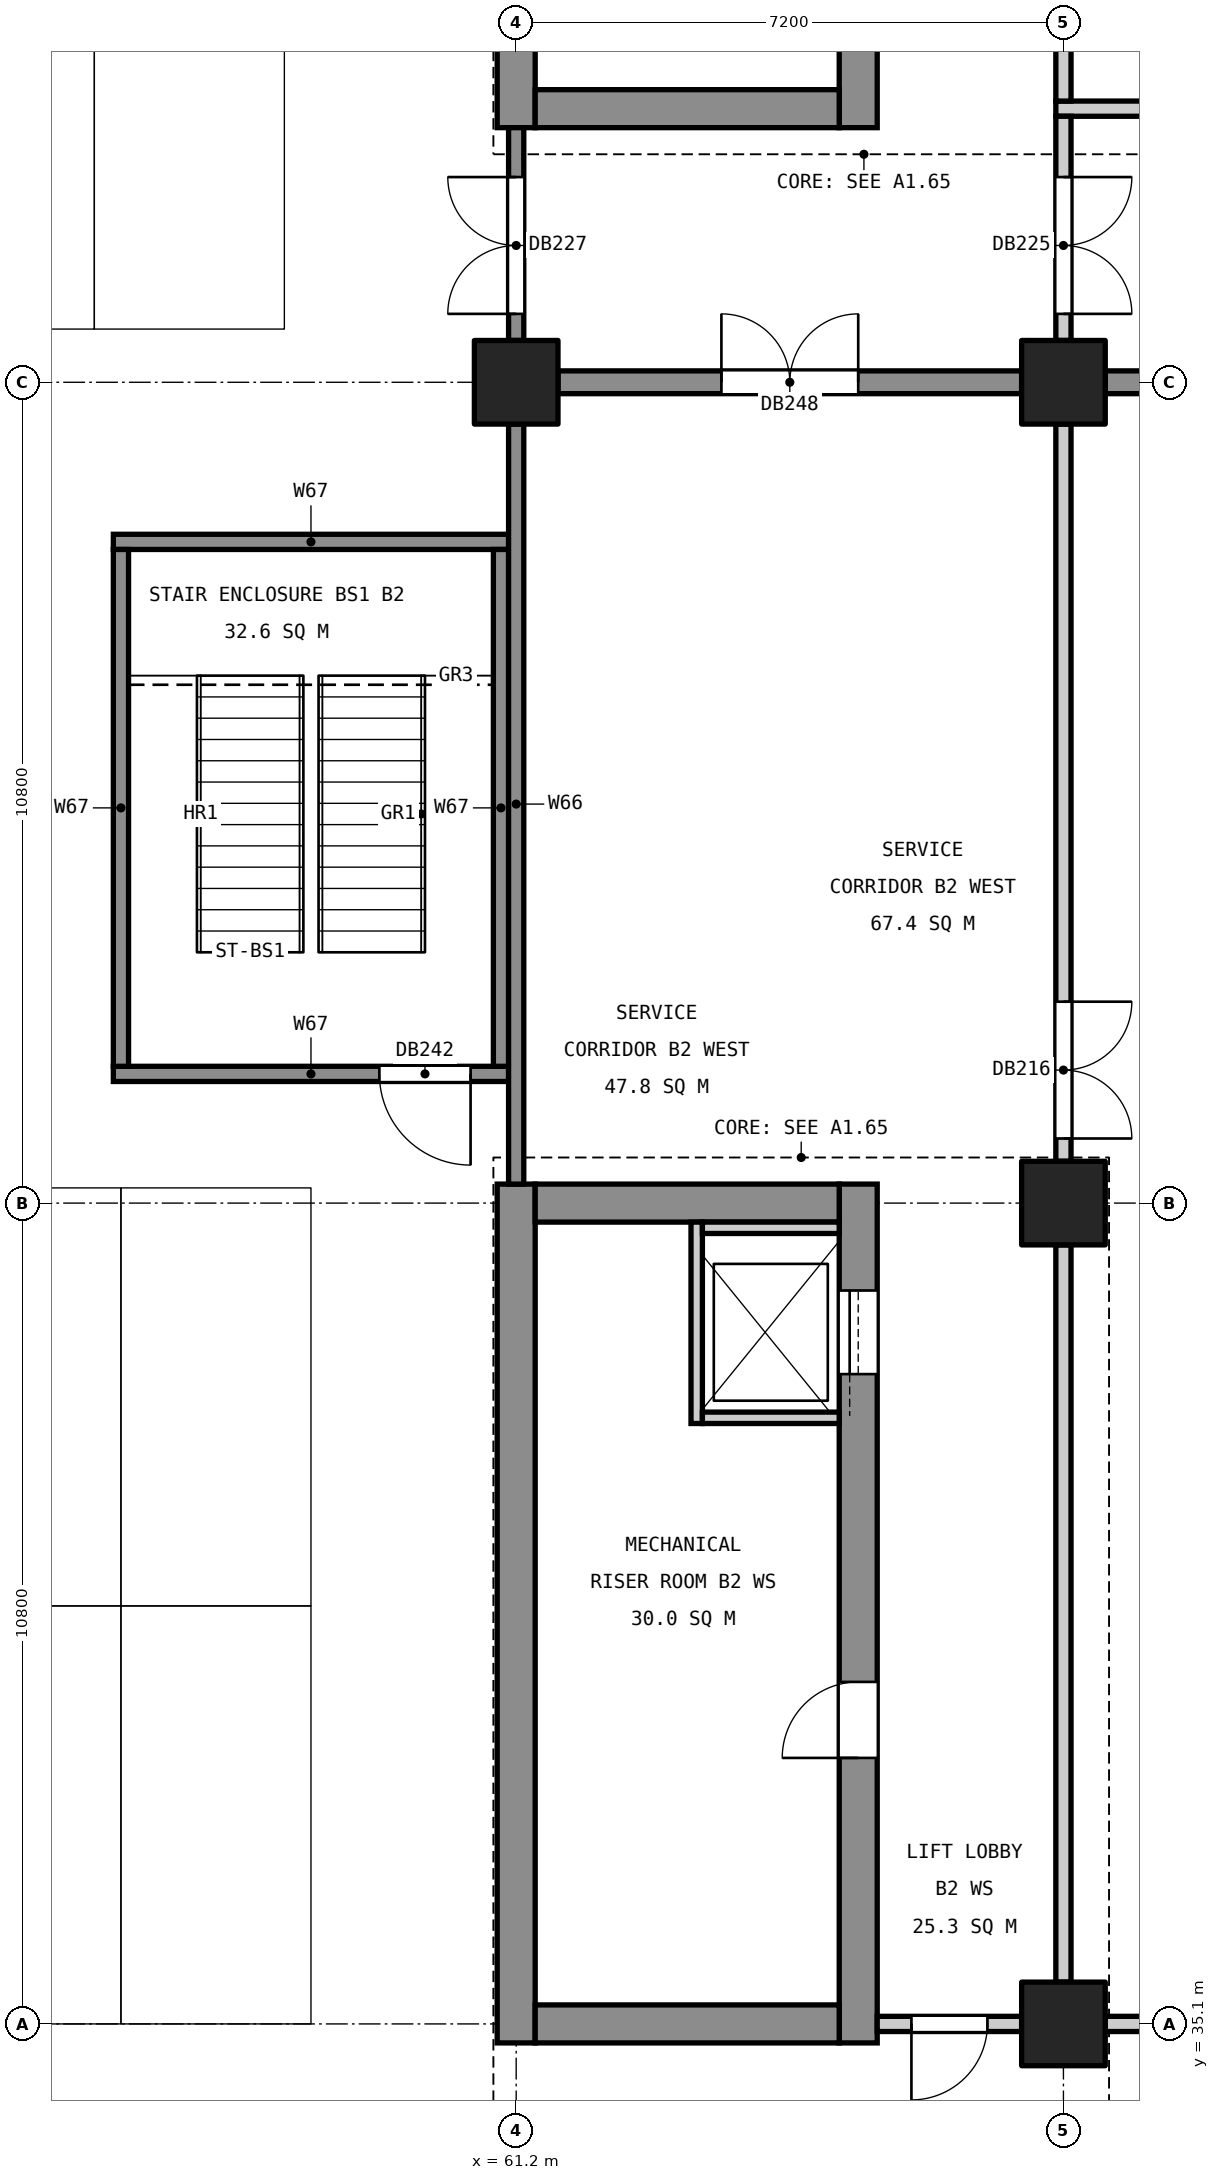
"""IFC4 building model, lengths in metres.
Left out: names, types, materials, properties, quantities, classifications, styles, units other than length and angle.
Written with IfcOpenShell. Run it as: python <this file> out.ifc"""

import sys

from ifc_helpers import new_model, si_unit, direction, frame, frame_2d, origin, origin_2d, place, context, subcontext, project, spatial, rectangle, extrude, element, fill, save


model = new_model("IFC4")
c1 = context("Model", 3, precision=1e-05, world=origin(), true_north=direction((0.0, 1.0)))
c2 = subcontext(c1, "Body", "Model", "MODEL_VIEW")
j1 = project(units=[si_unit("LENGTHUNIT", "METRE"), si_unit("PLANEANGLEUNIT", "RADIAN")], contexts=[c1])
p1 = place(None, origin())
s1 = spatial("IfcSite", under=j1, at=p1, CompositionType="ELEMENT")
p2 = place(p1, origin())
s2 = spatial("IfcBuilding", under=s1, at=p2, CompositionType="ELEMENT")
p3 = place(p2, frame((0.0, 0.0, -9.6)))
s3 = spatial("IfcBuildingStorey", under=s2, at=p3, CompositionType="ELEMENT", Elevation=-9.6)
for number, where, z_axis, x_axis in (
    (1, (61.2, 56.7, 0.0), (0.0, 0.0, 1.0), (1.0, 0.0, 0.0)),
    (2, (68.4, 35.1, 0.0), (0.0, 0.0, 1.0), (1.0, 0.0, 0.0)),
    (3, (68.4, 45.9, 0.0), (0.0, 0.0, 1.0), (1.0, 0.0, 0.0)),
    (4, (68.4, 56.7, 0.0), (0.0, 0.0, 1.0), (1.0, 0.0, 0.0)),
):
    element("IfcColumn", number, at=place(p3, frame(where, z_axis=z_axis, x_axis=x_axis)), inside=s3, PredefinedType="COLUMN", context=c2, shape_type="SweptSolid", body=[
        extrude(rectangle(XDim=1.1, YDim=1.1, at=origin_2d()), origin(), (0.0, 0.0, 1.0), 4.35),
    ])
p4 = place(p3, frame((61.2, 34.85, 0.0), z_axis=(0.0, 0.0, 1.0), x_axis=(0.0, 1.0, 0.0)))
e5 = element("IfcWall", 5, at=p4, inside=s3, PredefinedType="SHEAR", context=c2, shape_type="SweptSolid", body=[
    extrude(rectangle(XDim=11.3, YDim=0.5, at=frame_2d((5.65, 0.0))), origin(), (0.0, 0.0, 1.0), 4.35),
])
p5 = place(p3, frame((65.7, 34.85, 0.0), z_axis=(0.0, 0.0, 1.0), x_axis=(0.0, 1.0, 0.0)))
e6 = element("IfcWall", 6, at=p5, inside=s3, PredefinedType="SHEAR", context=c2, shape_type="SweptSolid", body=[
    extrude(rectangle(XDim=11.3, YDim=0.5, at=frame_2d((5.65, 0.0))), origin(), (0.0, 0.0, 1.0), 4.35),
])
p6 = place(p5, frame((8.8, 0.0, 0.0)))
e7 = element("IfcOpeningElement", 7, at=p6, cuts=e6, PredefinedType="OPENING", context=c2, shape_type="SweptSolid", body=[
    extrude(rectangle(XDim=1.1, YDim=2.1, at=frame_2d((0.55, 1.05))), frame((0.0, 0.26, 0.0), z_axis=(0.0, -1.0, 0.0), x_axis=(1.0, 0.0, 0.0)), (0.0, 0.0, 1.0), 0.52),
])
p7 = place(p5, frame((3.75, 0.0, 0.0)))
e8 = element("IfcOpeningElement", 8, at=p7, cuts=e6, PredefinedType="OPENING", context=c2, shape_type="SweptSolid", body=[
    extrude(rectangle(XDim=1.0, YDim=2.1, at=frame_2d((0.5, 1.05))), frame((0.0, 0.26, 0.0), z_axis=(0.0, -1.0, 0.0), x_axis=(1.0, 0.0, 0.0)), (0.0, 0.0, 1.0), 0.52),
])
for number, where, z_axis, x_axis in (
    (9, (61.45, 35.1, 0.0), (0.0, 0.0, 1.0), (1.0, 0.0, 0.0)),
    (10, (61.45, 45.9, 0.0), (0.0, 0.0, 1.0), (1.0, 0.0, 0.0)),
):
    element("IfcWall", number, at=place(p3, frame(where, z_axis=z_axis, x_axis=x_axis)), inside=s3, PredefinedType="SHEAR", context=c2, shape_type="SweptSolid", body=[
        extrude(rectangle(XDim=4.0, YDim=0.5, at=frame_2d((2.0, 0.0))), origin(), (0.0, 0.0, 1.0), 4.35),
    ])
p8 = place(p3, frame((61.2, 60.05, 0.0), z_axis=(0.0, 0.0, 1.0), x_axis=(0.0, 1.0, 0.0)))
e11 = element("IfcWall", 11, at=p8, inside=s3, PredefinedType="SHEAR", context=c2, shape_type="SweptSolid", body=[
    extrude(rectangle(XDim=14.9, YDim=0.5, at=frame_2d((7.45, 0.0))), origin(), (0.0, 0.0, 1.0), 4.35),
])
p9 = place(p3, frame((65.7, 60.05, 0.0), z_axis=(0.0, 0.0, 1.0), x_axis=(0.0, 1.0, 0.0)))
e12 = element("IfcWall", 12, at=p9, inside=s3, PredefinedType="SHEAR", context=c2, shape_type="SweptSolid", body=[
    extrude(rectangle(XDim=14.9, YDim=0.5, at=frame_2d((7.45, 0.0))), origin(), (0.0, 0.0, 1.0), 4.35),
])
p10 = place(p9, frame((8.85, 0.0, 0.0)))
e13 = element("IfcOpeningElement", 13, at=p10, cuts=e12, PredefinedType="OPENING", context=c2, shape_type="SweptSolid", body=[
    extrude(rectangle(XDim=1.1, YDim=2.1, at=frame_2d((0.55, 1.05))), frame((0.0, 0.26, 0.0), z_axis=(0.0, -1.0, 0.0), x_axis=(1.0, 0.0, 0.0)), (0.0, 0.0, 1.0), 0.52),
])
p11 = place(p9, frame((11.4, 0.0, 0.0)))
e14 = element("IfcOpeningElement", 14, at=p11, cuts=e12, PredefinedType="OPENING", context=c2, shape_type="SweptSolid", body=[
    extrude(rectangle(XDim=1.1, YDim=2.1, at=frame_2d((0.55, 1.05))), frame((0.0, 0.26, 0.0), z_axis=(0.0, -1.0, 0.0), x_axis=(1.0, 0.0, 0.0)), (0.0, 0.0, 1.0), 0.52),
])
p12 = place(p9, frame((3.75, 0.0, 0.0)))
e15 = element("IfcOpeningElement", 15, at=p12, cuts=e12, PredefinedType="OPENING", context=c2, shape_type="SweptSolid", body=[
    extrude(rectangle(XDim=1.0, YDim=2.1, at=frame_2d((0.5, 1.05))), frame((0.0, 0.26, 0.0), z_axis=(0.0, -1.0, 0.0), x_axis=(1.0, 0.0, 0.0)), (0.0, 0.0, 1.0), 0.52),
])
p13 = place(p3, frame((61.45, 60.3, 0.0), z_axis=(0.0, 0.0, 1.0), x_axis=(1.0, 0.0, 0.0)))
e16 = element("IfcWall", 16, at=p13, inside=s3, PredefinedType="SHEAR", context=c2, shape_type="SweptSolid", body=[
    extrude(rectangle(XDim=4.0, YDim=0.5, at=frame_2d((2.0, 0.0))), origin(), (0.0, 0.0, 1.0), 4.35),
])
p14 = place(p3, frame((61.75, 56.7, 0.0), z_axis=(0.0, 0.0, 1.0), x_axis=(1.0, 0.0, 0.0)))
e17 = element("IfcWall", 17, at=p14, inside=s3, PredefinedType="SHEAR", context=c2, shape_type="SweptSolid", body=[
    extrude(rectangle(XDim=6.1, YDim=0.3, at=frame_2d((3.05, 0.0))), origin(), (0.0, 0.0, 1.0), 4.35),
])
p15 = place(p14, frame((2.15, 0.0, 0.0)))
e18 = element("IfcOpeningElement", 18, at=p15, cuts=e17, PredefinedType="OPENING", context=c2, shape_type="SweptSolid", body=[
    extrude(rectangle(XDim=1.8, YDim=2.1, at=frame_2d((0.9, 1.05))), frame((0.0, 0.16, 0.0), z_axis=(0.0, -1.0, 0.0), x_axis=(1.0, 0.0, 0.0)), (0.0, 0.0, 1.0), 0.32),
])
p16 = place(p3, frame((68.95, 56.7, 0.0), z_axis=(0.0, 0.0, 1.0), x_axis=(1.0, 0.0, 0.0)))
e19 = element("IfcWall", 19, at=p16, inside=s3, PredefinedType="SHEAR", context=c2, shape_type="SweptSolid", body=[
    extrude(rectangle(XDim=9.7, YDim=0.3, at=frame_2d((4.85, 0.0))), origin(), (0.0, 0.0, 1.0), 4.35),
])
p17 = place(p3, frame((63.575, 43.0, 0.0), z_axis=(0.0, 0.0, 1.0), x_axis=(0.0, 1.0, 0.0)))
e20 = element("IfcWall", 20, at=p17, inside=s3, PredefinedType="SOLIDWALL", context=c2, shape_type="SweptSolid", body=[
    extrude(rectangle(XDim=2.65, YDim=0.15, at=frame_2d((1.325, 0.0))), origin(), (0.0, 0.0, 1.0), 4.8),
])
for number, where, z_axis, x_axis in (
    (21, (63.65, 43.075, 0.0), (0.0, 0.0, 1.0), (1.0, 0.0, 0.0)),
    (22, (63.65, 45.575, 0.0), (0.0, 0.0, 1.0), (1.0, 0.0, 0.0)),
):
    element("IfcWall", number, at=place(p3, frame(where, z_axis=z_axis, x_axis=x_axis)), inside=s3, PredefinedType="SOLIDWALL", context=c2, shape_type="SweptSolid", body=[
        extrude(rectangle(XDim=1.8, YDim=0.15, at=frame_2d((0.9, 0.0))), origin(), (0.0, 0.0, 1.0), 4.8),
    ])
p18 = place(p3, frame((65.95, 35.1, 0.0), z_axis=(0.0, 0.0, 1.0), x_axis=(1.0, 0.0, 0.0)))
e23 = element("IfcWall", 23, at=p18, inside=s3, PredefinedType="PARTITIONING", context=c2, shape_type="SweptSolid", body=[
    extrude(rectangle(XDim=1.9, YDim=0.2, at=frame_2d((0.95, 0.0))), origin(), (0.0, 0.0, 1.0), 4.35),
])
p19 = place(p18, frame((0.45, 0.0, 0.0)))
e24 = element("IfcOpeningElement", 24, at=p19, cuts=e23, PredefinedType="OPENING", context=c2, shape_type="SweptSolid", body=[
    extrude(rectangle(XDim=1.0, YDim=2.1, at=frame_2d((0.5, 1.05))), frame((0.0, 0.11, 0.0), z_axis=(0.0, -1.0, 0.0), x_axis=(1.0, 0.0, 0.0)), (0.0, 0.0, 1.0), 0.22),
])
p20 = place(p3, frame((68.95, 35.1, 0.0), z_axis=(0.0, 0.0, 1.0), x_axis=(1.0, 0.0, 0.0)))
e25 = element("IfcWall", 25, at=p20, inside=s3, PredefinedType="PARTITIONING", context=c2, shape_type="SweptSolid", body=[
    extrude(rectangle(XDim=9.7, YDim=0.2, at=frame_2d((4.85, 0.0))), origin(), (0.0, 0.0, 1.0), 4.35),
])
p21 = place(p3, frame((55.9, 47.6, 0.0), z_axis=(0.0, 0.0, 1.0), x_axis=(1.0, 0.0, 0.0)))
e26 = element("IfcWall", 26, at=p21, inside=s3, PredefinedType="SOLIDWALL", context=c2, shape_type="SweptSolid", body=[
    extrude(rectangle(XDim=5.2, YDim=0.2, at=frame_2d((2.6, 0.0))), origin(), (0.0, 0.0, 1.0), 4.35),
])
p22 = place(p21, frame((3.5, 0.0, 0.0)))
e27 = element("IfcOpeningElement", 27, at=p22, cuts=e26, PredefinedType="OPENING", context=c2, shape_type="SweptSolid", body=[
    extrude(rectangle(XDim=1.2, YDim=2.1, at=frame_2d((0.6, 1.05))), frame((0.0, 0.11, 0.0), z_axis=(0.0, -1.0, 0.0), x_axis=(1.0, 0.0, 0.0)), (0.0, 0.0, 1.0), 0.22),
])
p23 = place(p3, frame((55.9, 54.6, 0.0), z_axis=(0.0, 0.0, 1.0), x_axis=(1.0, 0.0, 0.0)))
e28 = element("IfcWall", 28, at=p23, inside=s3, PredefinedType="SOLIDWALL", context=c2, shape_type="SweptSolid", body=[
    extrude(rectangle(XDim=5.2, YDim=0.2, at=frame_2d((2.6, 0.0))), origin(), (0.0, 0.0, 1.0), 4.35),
])
p24 = place(p3, frame((68.3, 60.3, 0.0), z_axis=(0.0, 0.0, 1.0), x_axis=(1.0, 0.0, 0.0)))
e29 = element("IfcWall", 29, at=p24, inside=s3, PredefinedType="PARTITIONING", context=c2, shape_type="SweptSolid", body=[
    extrude(rectangle(XDim=11.0, YDim=0.2, at=frame_2d((5.5, 0.0))), origin(), (0.0, 0.0, 1.0), 4.35),
])
for number, where, z_axis, x_axis in (
    (30, (56.0, 47.7, 0.0), (0.0, 0.0, 1.0), (0.0, 1.0, 0.0)),
    (31, (61.0, 47.7, 0.0), (0.0, 0.0, 1.0), (0.0, 1.0, 0.0)),
):
    element("IfcWall", number, at=place(p3, frame(where, z_axis=z_axis, x_axis=x_axis)), inside=s3, PredefinedType="SOLIDWALL", context=c2, shape_type="SweptSolid", body=[
        extrude(rectangle(XDim=6.8, YDim=0.2, at=frame_2d((3.4, 0.0))), origin(), (0.0, 0.0, 1.0), 4.35),
    ])
p25 = place(p3, frame((61.2, 46.15, 0.0), z_axis=(0.0, 0.0, 1.0), x_axis=(0.0, 1.0, 0.0)))
e32 = element("IfcWall", 32, at=p25, inside=s3, PredefinedType="SOLIDWALL", context=c2, shape_type="SweptSolid", body=[
    extrude(rectangle(XDim=10.0, YDim=0.2, at=frame_2d((5.0, 0.0))), origin(), (0.0, 0.0, 1.0), 4.35),
])
p26 = place(p3, frame((61.2, 57.25, 0.0), z_axis=(0.0, 0.0, 1.0), x_axis=(0.0, 1.0, 0.0)))
e33 = element("IfcWall", 33, at=p26, inside=s3, PredefinedType="SOLIDWALL", context=c2, shape_type="SweptSolid", body=[
    extrude(rectangle(XDim=2.8, YDim=0.2, at=frame_2d((1.4, 0.0))), origin(), (0.0, 0.0, 1.0), 4.35),
])
p27 = place(p26, frame((0.35, 0.0, 0.0)))
e34 = element("IfcOpeningElement", 34, at=p27, cuts=e33, PredefinedType="OPENING", context=c2, shape_type="SweptSolid", body=[
    extrude(rectangle(XDim=1.8, YDim=2.1, at=frame_2d((0.9, 1.05))), frame((0.0, 0.11, 0.0), z_axis=(0.0, -1.0, 0.0), x_axis=(1.0, 0.0, 0.0)), (0.0, 0.0, 1.0), 0.22),
])
p28 = place(p3, frame((68.4, 35.65, 0.0), z_axis=(0.0, 0.0, 1.0), x_axis=(0.0, 1.0, 0.0)))
e35 = element("IfcWall", 35, at=p28, inside=s3, PredefinedType="PARTITIONING", context=c2, shape_type="SweptSolid", body=[
    extrude(rectangle(XDim=9.7, YDim=0.2, at=frame_2d((4.85, 0.0))), origin(), (0.0, 0.0, 1.0), 4.35),
])
p29 = place(p3, frame((68.4, 46.45, 0.0), z_axis=(0.0, 0.0, 1.0), x_axis=(0.0, 1.0, 0.0)))
e36 = element("IfcWall", 36, at=p29, inside=s3, PredefinedType="PARTITIONING", context=c2, shape_type="SweptSolid", body=[
    extrude(rectangle(XDim=9.7, YDim=0.2, at=frame_2d((4.85, 0.0))), origin(), (0.0, 0.0, 1.0), 4.35),
])
p30 = place(p29, frame((0.3, 0.0, 0.0)))
e37 = element("IfcOpeningElement", 37, at=p30, cuts=e36, PredefinedType="OPENING", context=c2, shape_type="SweptSolid", body=[
    extrude(rectangle(XDim=1.8, YDim=2.1, at=frame_2d((0.9, 1.05))), frame((0.0, 0.11, 0.0), z_axis=(0.0, -1.0, 0.0), x_axis=(1.0, 0.0, 0.0)), (0.0, 0.0, 1.0), 0.22),
])
p31 = place(p3, frame((68.4, 57.25, 0.0), z_axis=(0.0, 0.0, 1.0), x_axis=(0.0, 1.0, 0.0)))
e38 = element("IfcWall", 38, at=p31, inside=s3, PredefinedType="PARTITIONING", context=c2, shape_type="SweptSolid", body=[
    extrude(rectangle(XDim=2.95, YDim=0.2, at=frame_2d((1.475, 0.0))), origin(), (0.0, 0.0, 1.0), 4.35),
])
p32 = place(p31, frame((0.35, 0.0, 0.0)))
e39 = element("IfcOpeningElement", 39, at=p32, cuts=e38, PredefinedType="OPENING", context=c2, shape_type="SweptSolid", body=[
    extrude(rectangle(XDim=1.8, YDim=2.1, at=frame_2d((0.9, 1.05))), frame((0.0, 0.11, 0.0), z_axis=(0.0, -1.0, 0.0), x_axis=(1.0, 0.0, 0.0)), (0.0, 0.0, 1.0), 0.22),
])
p33 = place(p3, frame((68.4, 60.4, 0.0), z_axis=(0.0, 0.0, 1.0), x_axis=(0.0, 1.0, 0.0)))
e40 = element("IfcWall", 40, at=p33, inside=s3, PredefinedType="PARTITIONING", context=c2, shape_type="SweptSolid", body=[
    extrude(rectangle(XDim=6.55, YDim=0.2, at=frame_2d((3.275, 0.0))), origin(), (0.0, 0.0, 1.0), 4.35),
])
p34 = place(p6, origin())
e41 = element("IfcDoor", 41, at=p34, inside=s3, OperationType="SLIDING_TO_LEFT", PredefinedType="DOOR", context=c2, shape_type="SweptSolid", body=[
    extrude(rectangle(XDim=1.1, YDim=2.1, at=frame_2d((0.55, 1.05))), frame((0.0, 0.025, 0.0), z_axis=(0.0, -1.0, 0.0), x_axis=(1.0, 0.0, 0.0)), (0.0, 0.0, 1.0), 0.05),
])
fill(e7, e41)
p35 = place(p30, frame((1.8, 0.0, 0.0), z_axis=(0.0, 0.0, 1.0), x_axis=(-1.0, 0.0, 0.0)))
e42 = element("IfcDoor", 42, at=p35, inside=s3, OperationType="DOUBLE_DOOR_SINGLE_SWING", PredefinedType="DOOR", context=c2, shape_type="SweptSolid", body=[
    extrude(rectangle(XDim=1.8, YDim=2.1, at=frame_2d((0.9, 1.05))), frame((0.0, 0.025, 0.0), z_axis=(0.0, -1.0, 0.0), x_axis=(1.0, 0.0, 0.0)), (0.0, 0.0, 1.0), 0.05),
])
fill(e37, e42)
p36 = place(p19, frame((1.0, 0.0, 0.0), z_axis=(0.0, 0.0, 1.0), x_axis=(-1.0, 0.0, 0.0)))
e43 = element("IfcDoor", 43, at=p36, inside=s3, OperationType="SINGLE_SWING_RIGHT", PredefinedType="DOOR", context=c2, shape_type="SweptSolid", body=[
    extrude(rectangle(XDim=1.0, YDim=2.1, at=frame_2d((0.5, 1.05))), frame((0.0, 0.025, 0.0), z_axis=(0.0, -1.0, 0.0), x_axis=(1.0, 0.0, 0.0)), (0.0, 0.0, 1.0), 0.05),
])
fill(e24, e43)
p37 = place(p32, frame((1.8, 0.0, 0.0), z_axis=(0.0, 0.0, 1.0), x_axis=(-1.0, 0.0, 0.0)))
e44 = element("IfcDoor", 44, at=p37, inside=s3, OperationType="DOUBLE_DOOR_SINGLE_SWING", PredefinedType="DOOR", context=c2, shape_type="SweptSolid", body=[
    extrude(rectangle(XDim=1.8, YDim=2.1, at=frame_2d((0.9, 1.05))), frame((0.0, 0.025, 0.0), z_axis=(0.0, -1.0, 0.0), x_axis=(1.0, 0.0, 0.0)), (0.0, 0.0, 1.0), 0.05),
])
fill(e39, e44)
p38 = place(p27, origin())
e45 = element("IfcDoor", 45, at=p38, inside=s3, OperationType="DOUBLE_DOOR_SINGLE_SWING", PredefinedType="DOOR", context=c2, shape_type="SweptSolid", body=[
    extrude(rectangle(XDim=1.8, YDim=2.1, at=frame_2d((0.9, 1.05))), frame((0.0, 0.025, 0.0), z_axis=(0.0, -1.0, 0.0), x_axis=(1.0, 0.0, 0.0)), (0.0, 0.0, 1.0), 0.05),
])
fill(e34, e45)
p39 = place(p7, origin())
e46 = element("IfcDoor", 46, at=p39, inside=s3, OperationType="SINGLE_SWING_LEFT", PredefinedType="DOOR", context=c2, shape_type="SweptSolid", body=[
    extrude(rectangle(XDim=1.0, YDim=2.1, at=frame_2d((0.5, 1.05))), frame((0.0, 0.025, 0.0), z_axis=(0.0, -1.0, 0.0), x_axis=(1.0, 0.0, 0.0)), (0.0, 0.0, 1.0), 0.05),
])
fill(e8, e46)
p40 = place(p22, frame((1.2, 0.0, 0.0), z_axis=(0.0, 0.0, 1.0), x_axis=(-1.0, 0.0, 0.0)))
e47 = element("IfcDoor", 47, at=p40, inside=s3, OperationType="SINGLE_SWING_LEFT", PredefinedType="DOOR", context=c2, shape_type="SweptSolid", body=[
    extrude(rectangle(XDim=1.2, YDim=2.1, at=frame_2d((0.6, 1.05))), frame((0.0, 0.025, 0.0), z_axis=(0.0, -1.0, 0.0), x_axis=(1.0, 0.0, 0.0)), (0.0, 0.0, 1.0), 0.05),
])
fill(e27, e47)
p41 = place(p15, origin())
e48 = element("IfcDoor", 48, at=p41, inside=s3, OperationType="DOUBLE_DOOR_SINGLE_SWING", PredefinedType="DOOR", context=c2, shape_type="SweptSolid", body=[
    extrude(rectangle(XDim=1.8, YDim=2.1, at=frame_2d((0.9, 1.05))), frame((0.0, 0.025, 0.0), z_axis=(0.0, -1.0, 0.0), x_axis=(1.0, 0.0, 0.0)), (0.0, 0.0, 1.0), 0.05),
])
fill(e18, e48)
save(model, sys.argv[1])
